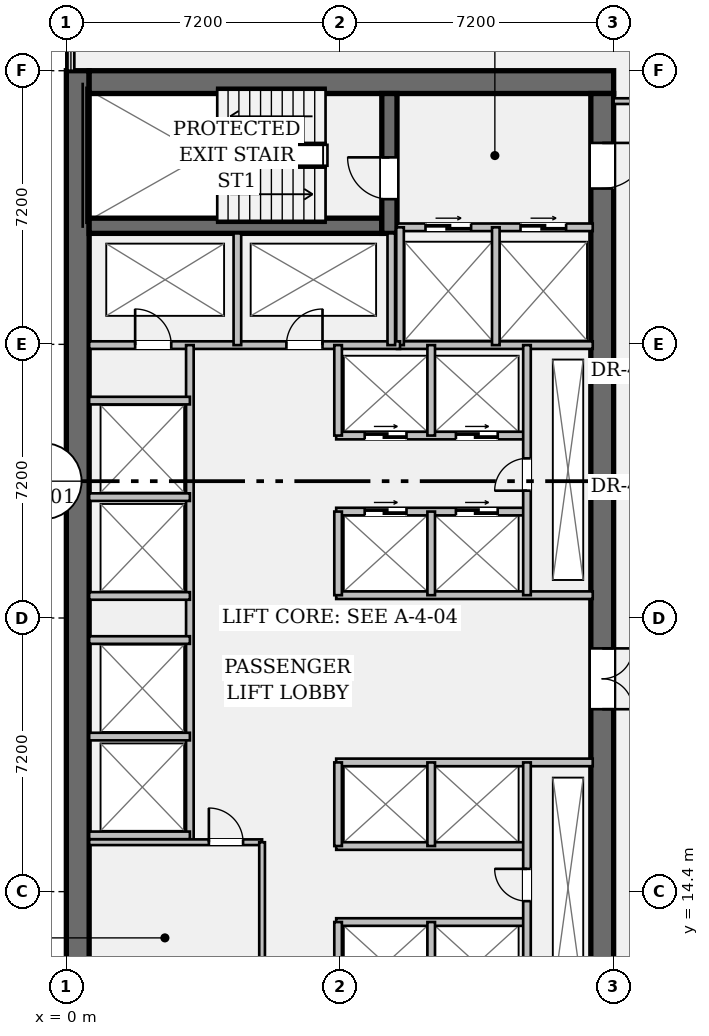
"""IFC4 building model, lengths in metres.
Left out: names, types, materials, properties, quantities, classifications, styles, units other than length and angle.
Written with IfcOpenShell. Run it as: python <this file> out.ifc"""

import sys

from ifc_helpers import new_model, si_unit, direction, frame, frame_2d, origin, place, context, subcontext, project, spatial, rectangle, extrude, element, fill, save


model = new_model("IFC4")
c1 = context("Model", 3, precision=1e-05, world=origin(), true_north=direction((0.0, 1.0)))
c2 = subcontext(c1, "Body", "Model", "MODEL_VIEW")
j1 = project(units=[si_unit("LENGTHUNIT", "METRE"), si_unit("PLANEANGLEUNIT", "RADIAN")], contexts=[c1])
p1 = place(None, origin())
s1 = spatial("IfcSite", under=j1, at=p1, CompositionType="ELEMENT")
p2 = place(p1, origin())
s2 = spatial("IfcBuilding", under=s1, at=p2, CompositionType="ELEMENT")
p3 = place(p2, frame((0.0, 0.0, 50.4)))
s3 = spatial("IfcBuildingStorey", under=s2, at=p3, CompositionType="ELEMENT", Elevation=50.4)
p4 = place(p3, frame((0.3, 7.2, 0.0), z_axis=(0.0, 0.0, 1.0), x_axis=(0.0, 1.0, 0.0)))
e1 = element("IfcWall", 1, at=p4, inside=s3, PredefinedType="SHEAR", context=c2, shape_type="SweptSolid", body=[
    extrude(rectangle(XDim=28.8, YDim=0.6, at=frame_2d((14.4, 0.0))), origin(), (0.0, 0.0, 1.0), 3.57),
])
p5 = place(p3, frame((0.6, 35.7, 0.0), z_axis=(0.0, 0.0, 1.0), x_axis=(1.0, 0.0, 0.0)))
e2 = element("IfcWall", 2, at=p5, inside=s3, PredefinedType="SHEAR", context=c2, shape_type="SweptSolid", body=[
    extrude(rectangle(XDim=13.8, YDim=0.6, at=frame_2d((6.9, 0.0))), origin(), (0.0, 0.0, 1.0), 3.57),
])
p6 = place(p3, frame((14.1, 35.4, 0.0), z_axis=(0.0, 0.0, 1.0), x_axis=(0.0, -1.0, 0.0)))
e3 = element("IfcWall", 3, at=p6, inside=s3, PredefinedType="SHEAR", context=c2, shape_type="SweptSolid", body=[
    extrude(rectangle(XDim=27.6, YDim=0.6, at=frame_2d((13.8, 0.0))), origin(), (0.0, 0.0, 1.0), 3.57),
])
p7 = place(p6, frame((1.3, 0.0, 0.0)))
e4 = element("IfcOpeningElement", 4, at=p7, cuts=e3, PredefinedType="OPENING", context=c2, shape_type="SweptSolid", body=[
    extrude(rectangle(XDim=1.2, YDim=2.15, at=frame_2d((0.6, 1.075))), frame((0.0, 0.312, 0.0), z_axis=(0.0, -1.0, 0.0), x_axis=(1.0, 0.0, 0.0)), (0.0, 0.0, 1.0), 0.624),
])
p8 = place(p6, frame((25.25, 0.0, 0.0)))
e5 = element("IfcOpeningElement", 5, at=p8, cuts=e3, PredefinedType="OPENING", context=c2, shape_type="SweptSolid", body=[
    extrude(rectangle(XDim=1.2, YDim=2.15, at=frame_2d((0.6, 1.075))), frame((0.0, 0.312, 0.0), z_axis=(0.0, -1.0, 0.0), x_axis=(1.0, 0.0, 0.0)), (0.0, 0.0, 1.0), 0.624),
])
p9 = place(p6, frame((14.6, 0.0, 0.0)))
e6 = element("IfcOpeningElement", 6, at=p9, cuts=e3, PredefinedType="OPENING", context=c2, shape_type="SweptSolid", body=[
    extrude(rectangle(XDim=1.6, YDim=2.2, at=frame_2d((0.8, 1.1))), frame((0.0, 0.312, 0.0), z_axis=(0.0, -1.0, 0.0), x_axis=(1.0, 0.0, 0.0)), (0.0, 0.0, 1.0), 0.624),
])
p10 = place(p3, frame((0.6, 31.92, 0.0), z_axis=(0.0, 0.0, 1.0), x_axis=(1.0, 0.0, 0.0)))
e7 = element("IfcWall", 7, at=p10, inside=s3, PredefinedType="SHEAR", context=c2, shape_type="SweptSolid", body=[
    extrude(rectangle(XDim=7.7, YDim=0.4, at=frame_2d((3.85, 0.0))), origin(), (0.0, 0.0, 1.0), 3.57),
])
p11 = place(p3, frame((8.5, 31.72, 0.0), z_axis=(0.0, 0.0, 1.0), x_axis=(0.0, 1.0, 0.0)))
e8 = element("IfcWall", 8, at=p11, inside=s3, PredefinedType="SHEAR", context=c2, shape_type="SweptSolid", body=[
    extrude(rectangle(XDim=3.68, YDim=0.4, at=frame_2d((1.84, 0.0))), origin(), (0.0, 0.0, 1.0), 3.57),
])
p12 = place(p11, frame((0.9, 0.0, 0.0)))
e9 = element("IfcOpeningElement", 9, at=p12, cuts=e8, PredefinedType="OPENING", context=c2, shape_type="SweptSolid", body=[
    extrude(rectangle(XDim=1.1, YDim=2.15, at=frame_2d((0.55, 1.075))), frame((0.0, 0.212, 0.0), z_axis=(0.0, -1.0, 0.0), x_axis=(1.0, 0.0, 0.0)), (0.0, 0.0, 1.0), 0.424),
])
p13 = place(p3, frame((8.7, 31.88, 0.0), z_axis=(0.0, 0.0, 1.0), x_axis=(1.0, 0.0, 0.0)))
e10 = element("IfcWall", 10, at=p13, inside=s3, PredefinedType="PARTITIONING", context=c2, shape_type="SweptSolid", body=[
    extrude(rectangle(XDim=5.15, YDim=0.2, at=frame_2d((2.575, 0.0))), origin(), (0.0, 0.0, 1.0), 3.57),
])
p14 = place(p13, frame((0.75, 0.0, 0.0)))
e11 = element("IfcOpeningElement", 11, at=p14, cuts=e10, PredefinedType="OPENING", context=c2, shape_type="SweptSolid", body=[
    extrude(rectangle(XDim=1.2, YDim=2.2, at=frame_2d((0.6, 1.1))), frame((0.0, 0.112, 0.0), z_axis=(0.0, -1.0, 0.0), x_axis=(1.0, 0.0, 0.0)), (0.0, 0.0, 1.0), 0.224),
])
p15 = place(p13, frame((3.25, 0.0, 0.0)))
e12 = element("IfcOpeningElement", 12, at=p15, cuts=e10, PredefinedType="OPENING", context=c2, shape_type="SweptSolid", body=[
    extrude(rectangle(XDim=1.2, YDim=2.2, at=frame_2d((0.6, 1.1))), frame((0.0, 0.112, 0.0), z_axis=(0.0, -1.0, 0.0), x_axis=(1.0, 0.0, 0.0)), (0.0, 0.0, 1.0), 0.224),
])
p16 = place(p3, frame((8.7, 28.78, 0.0), z_axis=(0.0, 0.0, 1.0), x_axis=(1.0, 0.0, 0.0)))
e13 = element("IfcWall", 13, at=p16, inside=s3, PredefinedType="PARTITIONING", context=c2, shape_type="SweptSolid", body=[
    extrude(rectangle(XDim=5.15, YDim=0.2, at=frame_2d((2.575, 0.0))), origin(), (0.0, 0.0, 1.0), 3.57),
])
for number, where, z_axis, x_axis in (
    (14, (8.78, 28.78, 0.0), (0.0, 0.0, 1.0), (0.0, 1.0, 0.0)),
    (15, (11.3, 28.78, 0.0), (0.0, 0.0, 1.0), (0.0, 1.0, 0.0)),
):
    element("IfcWall", number, at=place(p3, frame(where, z_axis=z_axis, x_axis=x_axis)), inside=s3, PredefinedType="PARTITIONING", context=c2, shape_type="SweptSolid", body=[
        extrude(rectangle(XDim=3.1, YDim=0.2, at=frame_2d((1.55, 0.0))), origin(), (0.0, 0.0, 1.0), 3.57),
    ])
p17 = place(p3, frame((0.6, 28.78, 0.0), z_axis=(0.0, 0.0, 1.0), x_axis=(1.0, 0.0, 0.0)))
e16 = element("IfcWall", 16, at=p17, inside=s3, PredefinedType="PARTITIONING", context=c2, shape_type="SweptSolid", body=[
    extrude(rectangle(XDim=8.18, YDim=0.2, at=frame_2d((4.09, 0.0))), origin(), (0.0, 0.0, 1.0), 3.57),
])
p18 = place(p17, frame((1.21, 0.0, 0.0)))
e17 = element("IfcOpeningElement", 17, at=p18, cuts=e16, PredefinedType="OPENING", context=c2, shape_type="SweptSolid", body=[
    extrude(rectangle(XDim=0.95, YDim=2.15, at=frame_2d((0.475, 1.075))), frame((0.0, 0.112, 0.0), z_axis=(0.0, -1.0, 0.0), x_axis=(1.0, 0.0, 0.0)), (0.0, 0.0, 1.0), 0.224),
])
p19 = place(p17, frame((5.19, 0.0, 0.0)))
e18 = element("IfcOpeningElement", 18, at=p19, cuts=e16, PredefinedType="OPENING", context=c2, shape_type="SweptSolid", body=[
    extrude(rectangle(XDim=0.95, YDim=2.15, at=frame_2d((0.475, 1.075))), frame((0.0, 0.112, 0.0), z_axis=(0.0, -1.0, 0.0), x_axis=(1.0, 0.0, 0.0)), (0.0, 0.0, 1.0), 0.224),
])
for number, where, z_axis, x_axis in (
    (19, (4.5, 28.78, 0.0), (0.0, 0.0, 1.0), (0.0, 1.0, 0.0)),
    (20, (8.55, 28.78, 0.0), (0.0, 0.0, 1.0), (0.0, 1.0, 0.0)),
):
    element("IfcWall", number, at=place(p3, frame(where, z_axis=z_axis, x_axis=x_axis)), inside=s3, PredefinedType="PARTITIONING", context=c2, shape_type="SweptSolid", body=[
        extrude(rectangle(XDim=2.94, YDim=0.2, at=frame_2d((1.47, 0.0))), origin(), (0.0, 0.0, 1.0), 3.57),
    ])
p20 = place(p3, frame((3.25, 15.7, 0.0), z_axis=(0.0, 0.0, 1.0), x_axis=(0.0, 1.0, 0.0)))
e21 = element("IfcWall", 21, at=p20, inside=s3, PredefinedType="PARTITIONING", context=c2, shape_type="SweptSolid", body=[
    extrude(rectangle(XDim=13.08, YDim=0.2, at=frame_2d((6.54, 0.0))), origin(), (0.0, 0.0, 1.0), 3.57),
])
for number, where, z_axis, x_axis in (
    (22, (0.6, 15.88, 0.0), (0.0, 0.0, 1.0), (1.0, 0.0, 0.0)),
    (23, (0.6, 18.48, 0.0), (0.0, 0.0, 1.0), (1.0, 0.0, 0.0)),
    (24, (0.6, 22.18, 0.0), (0.0, 0.0, 1.0), (1.0, 0.0, 0.0)),
    (25, (0.6, 24.78, 0.0), (0.0, 0.0, 1.0), (1.0, 0.0, 0.0)),
    (26, (0.6, 21.02, 0.0), (0.0, 0.0, 1.0), (1.0, 0.0, 0.0)),
    (27, (0.6, 27.32, 0.0), (0.0, 0.0, 1.0), (1.0, 0.0, 0.0)),
):
    element("IfcWall", number, at=place(p3, frame(where, z_axis=z_axis, x_axis=x_axis)), inside=s3, PredefinedType="PARTITIONING", context=c2, shape_type="SweptSolid", body=[
        extrude(rectangle(XDim=2.65, YDim=0.2, at=frame_2d((1.325, 0.0))), origin(), (0.0, 0.0, 1.0), 3.57),
    ])
p21 = place(p3, frame((7.1, 22.2, 0.0), z_axis=(0.0, 0.0, 1.0), x_axis=(1.0, 0.0, 0.0)))
e28 = element("IfcWall", 28, at=p21, inside=s3, PredefinedType="PARTITIONING", context=c2, shape_type="SweptSolid", body=[
    extrude(rectangle(XDim=6.75, YDim=0.2, at=frame_2d((3.375, 0.0))), origin(), (0.0, 0.0, 1.0), 3.57),
])
p22 = place(p3, frame((7.1, 24.4, 0.0), z_axis=(0.0, 0.0, 1.0), x_axis=(1.0, 0.0, 0.0)))
e29 = element("IfcWall", 29, at=p22, inside=s3, PredefinedType="PARTITIONING", context=c2, shape_type="SweptSolid", body=[
    extrude(rectangle(XDim=5.02, YDim=0.2, at=frame_2d((2.51, 0.0))), origin(), (0.0, 0.0, 1.0), 3.57),
])
p23 = place(p22, frame((0.75, 0.0, 0.0)))
e30 = element("IfcOpeningElement", 30, at=p23, cuts=e29, PredefinedType="OPENING", context=c2, shape_type="SweptSolid", body=[
    extrude(rectangle(XDim=1.1, YDim=2.2, at=frame_2d((0.55, 1.1))), frame((0.0, 0.112, 0.0), z_axis=(0.0, -1.0, 0.0), x_axis=(1.0, 0.0, 0.0)), (0.0, 0.0, 1.0), 0.224),
])
p24 = place(p22, frame((3.15, 0.0, 0.0)))
e31 = element("IfcOpeningElement", 31, at=p24, cuts=e29, PredefinedType="OPENING", context=c2, shape_type="SweptSolid", body=[
    extrude(rectangle(XDim=1.1, YDim=2.2, at=frame_2d((0.55, 1.1))), frame((0.0, 0.112, 0.0), z_axis=(0.0, -1.0, 0.0), x_axis=(1.0, 0.0, 0.0)), (0.0, 0.0, 1.0), 0.224),
])
p25 = place(p3, frame((7.1, 26.4, 0.0), z_axis=(0.0, 0.0, 1.0), x_axis=(1.0, 0.0, 0.0)))
e32 = element("IfcWall", 32, at=p25, inside=s3, PredefinedType="PARTITIONING", context=c2, shape_type="SweptSolid", body=[
    extrude(rectangle(XDim=5.02, YDim=0.2, at=frame_2d((2.51, 0.0))), origin(), (0.0, 0.0, 1.0), 3.57),
])
p26 = place(p25, frame((0.75, 0.0, 0.0)))
e33 = element("IfcOpeningElement", 33, at=p26, cuts=e32, PredefinedType="OPENING", context=c2, shape_type="SweptSolid", body=[
    extrude(rectangle(XDim=1.1, YDim=2.2, at=frame_2d((0.55, 1.1))), frame((0.0, 0.112, 0.0), z_axis=(0.0, -1.0, 0.0), x_axis=(1.0, 0.0, 0.0)), (0.0, 0.0, 1.0), 0.224),
])
p27 = place(p25, frame((3.15, 0.0, 0.0)))
e34 = element("IfcOpeningElement", 34, at=p27, cuts=e32, PredefinedType="OPENING", context=c2, shape_type="SweptSolid", body=[
    extrude(rectangle(XDim=1.1, YDim=2.2, at=frame_2d((0.55, 1.1))), frame((0.0, 0.112, 0.0), z_axis=(0.0, -1.0, 0.0), x_axis=(1.0, 0.0, 0.0)), (0.0, 0.0, 1.0), 0.224),
])
p28 = place(p3, frame((7.15, 22.2, 0.0), z_axis=(0.0, 0.0, 1.0), x_axis=(0.0, 1.0, 0.0)))
e35 = element("IfcWall", 35, at=p28, inside=s3, PredefinedType="PARTITIONING", context=c2, shape_type="SweptSolid", body=[
    extrude(rectangle(XDim=2.2, YDim=0.2, at=frame_2d((1.1, 0.0))), origin(), (0.0, 0.0, 1.0), 3.57),
])
p29 = place(p3, frame((7.15, 26.4, 0.0), z_axis=(0.0, 0.0, 1.0), x_axis=(0.0, 1.0, 0.0)))
e36 = element("IfcWall", 36, at=p29, inside=s3, PredefinedType="PARTITIONING", context=c2, shape_type="SweptSolid", body=[
    extrude(rectangle(XDim=2.38, YDim=0.2, at=frame_2d((1.19, 0.0))), origin(), (0.0, 0.0, 1.0), 3.57),
])
p30 = place(p3, frame((9.6, 22.2, 0.0), z_axis=(0.0, 0.0, 1.0), x_axis=(0.0, 1.0, 0.0)))
e37 = element("IfcWall", 37, at=p30, inside=s3, PredefinedType="PARTITIONING", context=c2, shape_type="SweptSolid", body=[
    extrude(rectangle(XDim=2.2, YDim=0.2, at=frame_2d((1.1, 0.0))), origin(), (0.0, 0.0, 1.0), 3.57),
])
p31 = place(p3, frame((9.6, 26.4, 0.0), z_axis=(0.0, 0.0, 1.0), x_axis=(0.0, 1.0, 0.0)))
e38 = element("IfcWall", 38, at=p31, inside=s3, PredefinedType="PARTITIONING", context=c2, shape_type="SweptSolid", body=[
    extrude(rectangle(XDim=2.38, YDim=0.2, at=frame_2d((1.19, 0.0))), origin(), (0.0, 0.0, 1.0), 3.57),
])
p32 = place(p3, frame((12.12, 22.2, 0.0), z_axis=(0.0, 0.0, 1.0), x_axis=(0.0, 1.0, 0.0)))
e39 = element("IfcWall", 39, at=p32, inside=s3, PredefinedType="PARTITIONING", context=c2, shape_type="SweptSolid", body=[
    extrude(rectangle(XDim=6.58, YDim=0.2, at=frame_2d((3.29, 0.0))), origin(), (0.0, 0.0, 1.0), 3.57),
])
p33 = place(p32, frame((2.75, 0.0, 0.0)))
e40 = element("IfcOpeningElement", 40, at=p33, cuts=e39, PredefinedType="OPENING", context=c2, shape_type="SweptSolid", body=[
    extrude(rectangle(XDim=0.85, YDim=2.15, at=frame_2d((0.425, 1.075))), frame((0.0, 0.112, 0.0), z_axis=(0.0, -1.0, 0.0), x_axis=(1.0, 0.0, 0.0)), (0.0, 0.0, 1.0), 0.224),
])
p34 = place(p3, frame((7.1, 17.8, 0.0), z_axis=(0.0, 0.0, 1.0), x_axis=(1.0, 0.0, 0.0)))
e41 = element("IfcWall", 41, at=p34, inside=s3, PredefinedType="PARTITIONING", context=c2, shape_type="SweptSolid", body=[
    extrude(rectangle(XDim=6.75, YDim=0.2, at=frame_2d((3.375, 0.0))), origin(), (0.0, 0.0, 1.0), 3.57),
])
for number, where, z_axis, x_axis in (
    (42, (7.1, 15.6, 0.0), (0.0, 0.0, 1.0), (1.0, 0.0, 0.0)),
    (43, (7.1, 13.6, 0.0), (0.0, 0.0, 1.0), (1.0, 0.0, 0.0)),
):
    element("IfcWall", number, at=place(p3, frame(where, z_axis=z_axis, x_axis=x_axis)), inside=s3, PredefinedType="PARTITIONING", context=c2, shape_type="SweptSolid", body=[
        extrude(rectangle(XDim=5.02, YDim=0.2, at=frame_2d((2.51, 0.0))), origin(), (0.0, 0.0, 1.0), 3.57),
    ])
p35 = place(p3, frame((7.15, 15.6, 0.0), z_axis=(0.0, 0.0, 1.0), x_axis=(0.0, 1.0, 0.0)))
e44 = element("IfcWall", 44, at=p35, inside=s3, PredefinedType="PARTITIONING", context=c2, shape_type="SweptSolid", body=[
    extrude(rectangle(XDim=2.2, YDim=0.2, at=frame_2d((1.1, 0.0))), origin(), (0.0, 0.0, 1.0), 3.57),
])
p36 = place(p3, frame((7.15, 11.2, 0.0), z_axis=(0.0, 0.0, 1.0), x_axis=(0.0, 1.0, 0.0)))
e45 = element("IfcWall", 45, at=p36, inside=s3, PredefinedType="PARTITIONING", context=c2, shape_type="SweptSolid", body=[
    extrude(rectangle(XDim=2.4, YDim=0.2, at=frame_2d((1.2, 0.0))), origin(), (0.0, 0.0, 1.0), 3.57),
])
p37 = place(p3, frame((9.6, 15.6, 0.0), z_axis=(0.0, 0.0, 1.0), x_axis=(0.0, 1.0, 0.0)))
e46 = element("IfcWall", 46, at=p37, inside=s3, PredefinedType="PARTITIONING", context=c2, shape_type="SweptSolid", body=[
    extrude(rectangle(XDim=2.2, YDim=0.2, at=frame_2d((1.1, 0.0))), origin(), (0.0, 0.0, 1.0), 3.57),
])
p38 = place(p3, frame((9.6, 11.2, 0.0), z_axis=(0.0, 0.0, 1.0), x_axis=(0.0, 1.0, 0.0)))
e47 = element("IfcWall", 47, at=p38, inside=s3, PredefinedType="PARTITIONING", context=c2, shape_type="SweptSolid", body=[
    extrude(rectangle(XDim=2.4, YDim=0.2, at=frame_2d((1.2, 0.0))), origin(), (0.0, 0.0, 1.0), 3.57),
])
p39 = place(p3, frame((12.12, 11.2, 0.0), z_axis=(0.0, 0.0, 1.0), x_axis=(0.0, 1.0, 0.0)))
e48 = element("IfcWall", 48, at=p39, inside=s3, PredefinedType="PARTITIONING", context=c2, shape_type="SweptSolid", body=[
    extrude(rectangle(XDim=6.6, YDim=0.2, at=frame_2d((3.3, 0.0))), origin(), (0.0, 0.0, 1.0), 3.57),
])
p40 = place(p39, frame((2.95, 0.0, 0.0)))
e49 = element("IfcOpeningElement", 49, at=p40, cuts=e48, PredefinedType="OPENING", context=c2, shape_type="SweptSolid", body=[
    extrude(rectangle(XDim=0.85, YDim=2.15, at=frame_2d((0.425, 1.075))), frame((0.0, 0.112, 0.0), z_axis=(0.0, -1.0, 0.0), x_axis=(1.0, 0.0, 0.0)), (0.0, 0.0, 1.0), 0.224),
])
p41 = place(p3, frame((0.6, 15.7, 0.0), z_axis=(0.0, 0.0, 1.0), x_axis=(1.0, 0.0, 0.0)))
e50 = element("IfcWall", 50, at=p41, inside=s3, PredefinedType="PARTITIONING", context=c2, shape_type="SweptSolid", body=[
    extrude(rectangle(XDim=4.55, YDim=0.15, at=frame_2d((2.275, 0.0))), origin(), (0.0, 0.0, 1.0), 3.57),
])
p42 = place(p41, frame((3.15, 0.0, 0.0)))
e51 = element("IfcOpeningElement", 51, at=p42, cuts=e50, PredefinedType="OPENING", context=c2, shape_type="SweptSolid", body=[
    extrude(rectangle(XDim=0.9, YDim=2.15, at=frame_2d((0.45, 1.075))), frame((0.0, 0.087, 0.0), z_axis=(0.0, -1.0, 0.0), x_axis=(1.0, 0.0, 0.0)), (0.0, 0.0, 1.0), 0.174),
])
p43 = place(p3, frame((5.15, 11.28, 0.0), z_axis=(0.0, 0.0, 1.0), x_axis=(0.0, 1.0, 0.0)))
e52 = element("IfcWall", 52, at=p43, inside=s3, PredefinedType="PARTITIONING", context=c2, shape_type="SweptSolid", body=[
    extrude(rectangle(XDim=4.42, YDim=0.15, at=frame_2d((2.21, 0.0))), origin(), (0.0, 0.0, 1.0), 3.57),
])
p44 = place(p3, frame((14.4, 35.2, 0.0), z_axis=(0.0, 0.0, 1.0), x_axis=(1.0, 0.0, 0.0)))
e53 = element("IfcWall", 53, at=p44, inside=s3, PredefinedType="PARTITIONING", context=c2, shape_type="SweptSolid", body=[
    extrude(rectangle(XDim=2.95, YDim=0.15, at=frame_2d((1.475, 0.0))), origin(), (0.0, 0.0, 1.0), 3.088),
])
p45 = place(p44, frame((0.95, 0.0, 0.0)))
e54 = element("IfcOpeningElement", 54, at=p45, cuts=e53, PredefinedType="OPENING", context=c2, shape_type="SweptSolid", body=[
    extrude(rectangle(XDim=1.0, YDim=2.15, at=frame_2d((0.5, 1.075))), frame((0.0, 0.087, 0.0), z_axis=(0.0, -1.0, 0.0), x_axis=(1.0, 0.0, 0.0)), (0.0, 0.0, 1.0), 0.174),
])
p46 = place(p12, origin())
e55 = element("IfcDoor", 55, at=p46, inside=s3, OperationType="SINGLE_SWING_RIGHT", PredefinedType="DOOR", context=c2, shape_type="SweptSolid", body=[
    extrude(rectangle(XDim=1.1, YDim=2.15, at=frame_2d((0.55, 1.075))), frame((0.0, 0.025, 0.0), z_axis=(0.0, -1.0, 0.0), x_axis=(1.0, 0.0, 0.0)), (0.0, 0.0, 1.0), 0.05),
])
fill(e9, e55)
p47 = place(p7, origin())
e56 = element("IfcDoor", 56, at=p47, inside=s3, OperationType="SINGLE_SWING_LEFT", PredefinedType="DOOR", context=c2, shape_type="SweptSolid", body=[
    extrude(rectangle(XDim=1.2, YDim=2.15, at=frame_2d((0.6, 1.075))), frame((0.0, 0.025, 0.0), z_axis=(0.0, -1.0, 0.0), x_axis=(1.0, 0.0, 0.0)), (0.0, 0.0, 1.0), 0.05),
])
fill(e4, e56)
p48 = place(p14, origin())
e57 = element("IfcDoor", 57, at=p48, inside=s3, OperationType="DOUBLE_DOOR_SLIDING", PredefinedType="DOOR", context=c2, shape_type="SweptSolid", body=[
    extrude(rectangle(XDim=1.2, YDim=2.2, at=frame_2d((0.6, 1.1))), frame((0.0, 0.025, 0.0), z_axis=(0.0, -1.0, 0.0), x_axis=(1.0, 0.0, 0.0)), (0.0, 0.0, 1.0), 0.05),
])
fill(e11, e57)
p49 = place(p15, origin())
e58 = element("IfcDoor", 58, at=p49, inside=s3, OperationType="DOUBLE_DOOR_SLIDING", PredefinedType="DOOR", context=c2, shape_type="SweptSolid", body=[
    extrude(rectangle(XDim=1.2, YDim=2.2, at=frame_2d((0.6, 1.1))), frame((0.0, 0.025, 0.0), z_axis=(0.0, -1.0, 0.0), x_axis=(1.0, 0.0, 0.0)), (0.0, 0.0, 1.0), 0.05),
])
fill(e12, e58)
p50 = place(p18, origin())
e59 = element("IfcDoor", 59, at=p50, inside=s3, OperationType="SINGLE_SWING_LEFT", PredefinedType="DOOR", context=c2, shape_type="SweptSolid", body=[
    extrude(rectangle(XDim=0.95, YDim=2.15, at=frame_2d((0.475, 1.075))), frame((0.0, 0.025, 0.0), z_axis=(0.0, -1.0, 0.0), x_axis=(1.0, 0.0, 0.0)), (0.0, 0.0, 1.0), 0.05),
])
fill(e17, e59)
p51 = place(p19, origin())
e60 = element("IfcDoor", 60, at=p51, inside=s3, OperationType="SINGLE_SWING_RIGHT", PredefinedType="DOOR", context=c2, shape_type="SweptSolid", body=[
    extrude(rectangle(XDim=0.95, YDim=2.15, at=frame_2d((0.475, 1.075))), frame((0.0, 0.025, 0.0), z_axis=(0.0, -1.0, 0.0), x_axis=(1.0, 0.0, 0.0)), (0.0, 0.0, 1.0), 0.05),
])
fill(e18, e60)
p52 = place(p9, origin())
e61 = element("IfcDoor", 61, at=p52, inside=s3, OperationType="DOUBLE_DOOR_SINGLE_SWING", PredefinedType="DOOR", context=c2, shape_type="SweptSolid", body=[
    extrude(rectangle(XDim=1.6, YDim=2.2, at=frame_2d((0.8, 1.1))), frame((0.0, 0.025, 0.0), z_axis=(0.0, -1.0, 0.0), x_axis=(1.0, 0.0, 0.0)), (0.0, 0.0, 1.0), 0.05),
])
fill(e6, e61)
p53 = place(p33, origin())
e62 = element("IfcDoor", 62, at=p53, inside=s3, OperationType="SINGLE_SWING_LEFT", PredefinedType="DOOR", context=c2, shape_type="SweptSolid", body=[
    extrude(rectangle(XDim=0.85, YDim=2.15, at=frame_2d((0.425, 1.075))), frame((0.0, 0.025, 0.0), z_axis=(0.0, -1.0, 0.0), x_axis=(1.0, 0.0, 0.0)), (0.0, 0.0, 1.0), 0.05),
])
fill(e40, e62)
p54 = place(p23, origin())
e63 = element("IfcDoor", 63, at=p54, inside=s3, OperationType="DOUBLE_DOOR_SLIDING", PredefinedType="DOOR", context=c2, shape_type="SweptSolid", body=[
    extrude(rectangle(XDim=1.1, YDim=2.2, at=frame_2d((0.55, 1.1))), frame((0.0, 0.025, 0.0), z_axis=(0.0, -1.0, 0.0), x_axis=(1.0, 0.0, 0.0)), (0.0, 0.0, 1.0), 0.05),
])
fill(e30, e63)
p55 = place(p24, origin())
e64 = element("IfcDoor", 64, at=p55, inside=s3, OperationType="DOUBLE_DOOR_SLIDING", PredefinedType="DOOR", context=c2, shape_type="SweptSolid", body=[
    extrude(rectangle(XDim=1.1, YDim=2.2, at=frame_2d((0.55, 1.1))), frame((0.0, 0.025, 0.0), z_axis=(0.0, -1.0, 0.0), x_axis=(1.0, 0.0, 0.0)), (0.0, 0.0, 1.0), 0.05),
])
fill(e31, e64)
p56 = place(p26, origin())
e65 = element("IfcDoor", 65, at=p56, inside=s3, OperationType="DOUBLE_DOOR_SLIDING", PredefinedType="DOOR", context=c2, shape_type="SweptSolid", body=[
    extrude(rectangle(XDim=1.1, YDim=2.2, at=frame_2d((0.55, 1.1))), frame((0.0, 0.025, 0.0), z_axis=(0.0, -1.0, 0.0), x_axis=(1.0, 0.0, 0.0)), (0.0, 0.0, 1.0), 0.05),
])
fill(e33, e65)
p57 = place(p27, origin())
e66 = element("IfcDoor", 66, at=p57, inside=s3, OperationType="DOUBLE_DOOR_SLIDING", PredefinedType="DOOR", context=c2, shape_type="SweptSolid", body=[
    extrude(rectangle(XDim=1.1, YDim=2.2, at=frame_2d((0.55, 1.1))), frame((0.0, 0.025, 0.0), z_axis=(0.0, -1.0, 0.0), x_axis=(1.0, 0.0, 0.0)), (0.0, 0.0, 1.0), 0.05),
])
fill(e34, e66)
p58 = place(p40, origin())
e67 = element("IfcDoor", 67, at=p58, inside=s3, OperationType="SINGLE_SWING_RIGHT", PredefinedType="DOOR", context=c2, shape_type="SweptSolid", body=[
    extrude(rectangle(XDim=0.85, YDim=2.15, at=frame_2d((0.425, 1.075))), frame((0.0, 0.025, 0.0), z_axis=(0.0, -1.0, 0.0), x_axis=(1.0, 0.0, 0.0)), (0.0, 0.0, 1.0), 0.05),
])
fill(e49, e67)
p59 = place(p42, origin())
e68 = element("IfcDoor", 68, at=p59, inside=s3, OperationType="SINGLE_SWING_LEFT", PredefinedType="DOOR", context=c2, shape_type="SweptSolid", body=[
    extrude(rectangle(XDim=0.9, YDim=2.15, at=frame_2d((0.45, 1.075))), frame((0.0, 0.025, 0.0), z_axis=(0.0, -1.0, 0.0), x_axis=(1.0, 0.0, 0.0)), (0.0, 0.0, 1.0), 0.05),
])
fill(e51, e68)
save(model, sys.argv[1])
